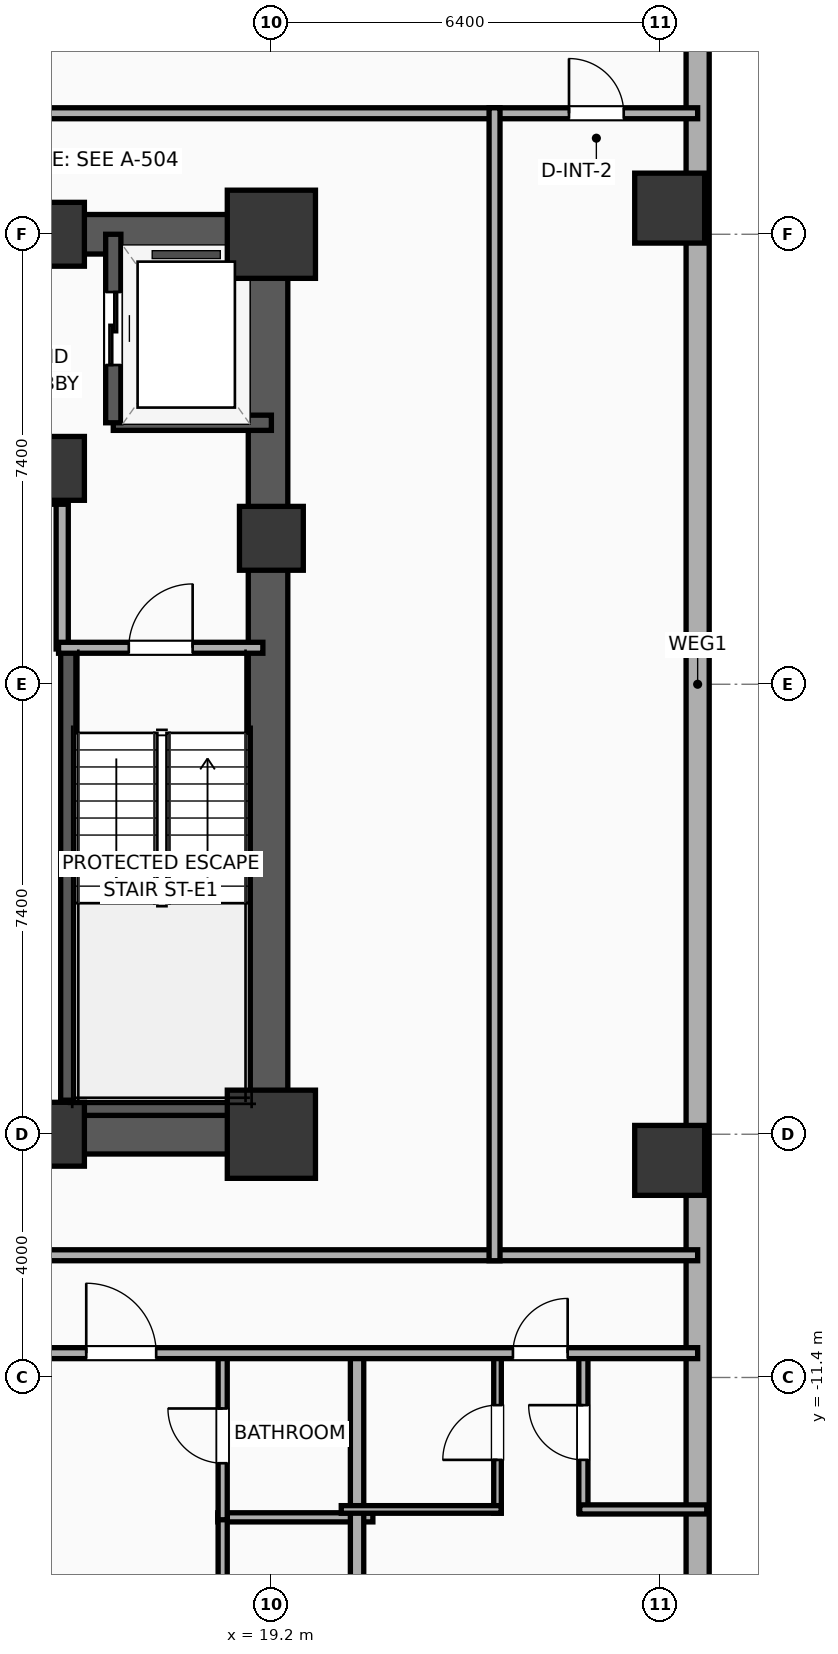
"""IFC4 building model, lengths in metres.
Left out: names, types, materials, properties, quantities, classifications, styles, units other than length and angle.
Written with IfcOpenShell. Run it as: python <this file> out.ifc"""

import sys

from ifc_helpers import new_model, si_unit, direction, frame, frame_2d, origin, origin_2d, place, context, subcontext, project, spatial, rectangle, hollow_rectangle, extrude, element, fill, save


model = new_model("IFC4")
c1 = context("Model", 3, precision=1e-05, world=origin(), true_north=direction((0.0, 1.0)))
c2 = subcontext(c1, "Body", "Model", "MODEL_VIEW")
j1 = project(units=[si_unit("LENGTHUNIT", "METRE"), si_unit("PLANEANGLEUNIT", "RADIAN")], contexts=[c1])
p1 = place(None, origin())
s1 = spatial("IfcSite", under=j1, at=p1, CompositionType="ELEMENT")
p2 = place(p1, origin())
s2 = spatial("IfcBuilding", under=s1, at=p2, CompositionType="ELEMENT")
p3 = place(p2, frame((0.0, 0.0, 65.0)))
s3 = spatial("IfcBuildingStorey", under=s2, at=p3, CompositionType="ELEMENT", Elevation=65.0)
for number, where, z_axis, x_axis in (
    (1, (15.6, 3.55, 0.0), (0.0, 0.0, 1.0), (1.0, 0.0, 0.0)),
    (2, (15.6, -7.4, 0.0), (0.0, 0.0, 1.0), (1.0, 0.0, 0.0)),
    (3, (15.6, 7.4, 0.0), (0.0, 0.0, 1.0), (1.0, 0.0, 0.0)),
):
    element("IfcColumn", number, at=place(p3, frame(where, z_axis=z_axis, x_axis=x_axis)), inside=s3, PredefinedType="COLUMN", context=c2, shape_type="SweptSolid", body=[
        extrude(rectangle(XDim=1.05, YDim=1.05, at=origin_2d()), origin(), (0.0, 0.0, 1.0), 3.9),
    ])
p4 = place(p3, frame((19.2, -7.4, 0.0), z_axis=(0.0, 0.0, 1.0), x_axis=(1.0, 0.0, 0.0)))
e4 = element("IfcColumn", 4, at=p4, inside=s3, PredefinedType="COLUMN", context=c2, shape_type="SweptSolid", body=[
    extrude(rectangle(XDim=1.45, YDim=1.45, at=origin_2d()), origin(), (0.0, 0.0, 1.0), 3.9),
])
p5 = place(p3, frame((19.2, 2.4, 0.0), z_axis=(0.0, 0.0, 1.0), x_axis=(1.0, 0.0, 0.0)))
e5 = element("IfcColumn", 5, at=p5, inside=s3, PredefinedType="COLUMN", context=c2, shape_type="SweptSolid", body=[
    extrude(rectangle(XDim=1.05, YDim=1.05, at=origin_2d()), origin(), (0.0, 0.0, 1.0), 3.9),
])
p6 = place(p3, frame((19.2, 7.4, 0.0), z_axis=(0.0, 0.0, 1.0), x_axis=(1.0, 0.0, 0.0)))
e6 = element("IfcColumn", 6, at=p6, inside=s3, PredefinedType="COLUMN", context=c2, shape_type="SweptSolid", body=[
    extrude(rectangle(XDim=1.45, YDim=1.45, at=origin_2d()), origin(), (0.0, 0.0, 1.0), 3.9),
])
for number, where, z_axis, x_axis in (
    (7, (12.075, -7.4, 0.0), (0.0, 0.0, 1.0), (1.0, 0.0, 0.0)),
    (8, (12.075, 7.4, 0.0), (0.0, 0.0, 1.0), (1.0, 0.0, 0.0)),
):
    element("IfcWall", number, at=place(p3, frame(where, z_axis=z_axis, x_axis=x_axis)), inside=s3, PredefinedType="SHEAR", context=c2, shape_type="SweptSolid", body=[
        extrude(rectangle(XDim=7.45, YDim=0.65, at=frame_2d((3.725, 0.0))), origin(), (0.0, 0.0, 1.0), 3.65),
    ])
p7 = place(p3, frame((19.145, -7.4, 0.0), z_axis=(0.0, 0.0, 1.0), x_axis=(0.0, 1.0, 0.0)))
e9 = element("IfcWall", 9, at=p7, inside=s3, PredefinedType="SHEAR", context=c2, shape_type="SweptSolid", body=[
    extrude(rectangle(XDim=14.8, YDim=0.65, at=frame_2d((7.4, 0.0))), origin(), (0.0, 0.0, 1.0), 3.65),
])
p8 = place(p3, frame((15.86, -7.085, 0.0), z_axis=(0.0, 0.0, 1.0), x_axis=(0.0, 1.0, 0.0)))
e10 = element("IfcWall", 10, at=p8, inside=s3, PredefinedType="SOLIDWALL", context=c2, shape_type="SweptSolid", body=[
    extrude(rectangle(XDim=7.685, YDim=0.25, at=frame_2d((3.843, 0.0))), origin(), (0.0, 0.0, 1.0), 3.65),
])
p9 = place(p3, frame((15.74, -6.965, 0.0), z_axis=(0.0, 0.0, 1.0), x_axis=(1.0, 0.0, 0.0)))
e11 = element("IfcWall", 11, at=p9, inside=s3, PredefinedType="SOLIDWALL", context=c2, shape_type="SweptSolid", body=[
    extrude(rectangle(XDim=3.46, YDim=0.25, at=frame_2d((1.73, 0.0))), origin(), (0.0, 0.0, 1.0), 3.65),
])
for number, where, z_axis, x_axis in (
    (12, (25.75, -7.83, 0.0), (0.0, 0.0, 1.0), (1.0, 0.0, 0.0)),
    (13, (25.75, 7.83, 0.0), (0.0, 0.0, 1.0), (1.0, 0.0, 0.0)),
):
    element("IfcColumn", number, at=place(p3, frame(where, z_axis=z_axis, x_axis=x_axis)), inside=s3, PredefinedType="COLUMN", context=c2, shape_type="SweptSolid", body=[
        extrude(hollow_rectangle(XDim=1.15, YDim=1.15, WallThickness=0.04, at=origin_2d()), origin(), (0.0, 0.0, 1.0), 3.9),
    ])
p10 = place(p3, frame((26.21, 18.381, 0.0), z_axis=(0.0, 0.0, 1.0), x_axis=(0.0, -1.0, 0.0)))
e14 = element("IfcWall", 14, at=p10, inside=s3, PredefinedType="ELEMENTEDWALL", context=c2, shape_type="SweptSolid", body=[
    extrude(rectangle(XDim=36.763, YDim=0.38, at=frame_2d((18.381, 0.0))), origin(), (0.0, 0.0, 1.0), 3.65),
])
p11 = place(p3, frame((16.6, 4.3, 0.0), z_axis=(0.0, 0.0, 1.0), x_axis=(1.0, 0.0, 0.0)))
e15 = element("IfcWall", 15, at=p11, inside=s3, PredefinedType="SOLIDWALL", context=c2, shape_type="SweptSolid", body=[
    extrude(rectangle(XDim=2.6, YDim=0.25, at=frame_2d((1.3, 0.0))), origin(), (0.0, 0.0, 1.0), 3.65),
])
p12 = place(p3, frame((16.6, 7.4, 0.0), z_axis=(0.0, 0.0, 1.0), x_axis=(0.0, -1.0, 0.0)))
e16 = element("IfcWall", 16, at=p12, inside=s3, PredefinedType="SOLIDWALL", context=c2, shape_type="SweptSolid", body=[
    extrude(rectangle(XDim=3.1, YDim=0.25, at=frame_2d((1.55, 0.0))), origin(), (0.0, 0.0, 1.0), 3.65),
])
p13 = place(p12, frame((0.95, 0.0, 0.0)))
e17 = element("IfcOpeningElement", 17, at=p13, cuts=e16, PredefinedType="OPENING", context=c2, shape_type="SweptSolid", body=[
    extrude(rectangle(XDim=1.2, YDim=2.05, at=frame_2d((0.6, 1.025))), frame((0.0, 0.135, 0.0), z_axis=(0.0, -1.0, 0.0), x_axis=(1.0, 0.0, 0.0)), (0.0, 0.0, 1.0), 0.27),
])
p14 = place(p3, frame((15.76, 0.58, 0.0), z_axis=(0.0, 0.0, 1.0), x_axis=(0.0, 1.0, 0.0)))
e18 = element("IfcWall", 18, at=p14, inside=s3, PredefinedType="PARTITIONING", context=c2, shape_type="SweptSolid", body=[
    extrude(rectangle(XDim=2.52, YDim=0.2, at=frame_2d((1.26, 0.0))), origin(), (0.0, 0.0, 1.0), 3.65),
])
p15 = place(p3, frame((12.66, 3.06, 0.0), z_axis=(0.0, 0.0, 1.0), x_axis=(1.0, 0.0, 0.0)))
e19 = element("IfcWall", 19, at=p15, inside=s3, PredefinedType="PARTITIONING", context=c2, shape_type="SweptSolid", body=[
    extrude(rectangle(XDim=3.16, YDim=0.2, at=frame_2d((1.58, 0.0))), origin(), (0.0, 0.0, 1.0), 3.65),
])
p16 = place(p3, frame((15.7, 0.6, 0.0), z_axis=(0.0, 0.0, 1.0), x_axis=(1.0, 0.0, 0.0)))
e20 = element("IfcWall", 20, at=p16, inside=s3, PredefinedType="PARTITIONING", context=c2, shape_type="SweptSolid", body=[
    extrude(rectangle(XDim=3.36, YDim=0.18, at=frame_2d((1.68, 0.0))), origin(), (0.0, 0.0, 1.0), 3.65),
])
p17 = place(p16, frame((1.155, 0.0, 0.0)))
e21 = element("IfcOpeningElement", 21, at=p17, cuts=e20, PredefinedType="OPENING", context=c2, shape_type="SweptSolid", body=[
    extrude(rectangle(XDim=1.05, YDim=2.05, at=frame_2d((0.525, 1.025))), frame((0.0, 0.1, 0.0), z_axis=(0.0, -1.0, 0.0), x_axis=(1.0, 0.0, 0.0)), (0.0, 0.0, 1.0), 0.2),
])
p18 = place(p3, frame((9.88, 9.39, 0.0), z_axis=(0.0, 0.0, 1.0), x_axis=(1.0, 0.0, 0.0)))
e22 = element("IfcWall", 22, at=p18, inside=s3, PredefinedType="PARTITIONING", context=c2, shape_type="SweptSolid", body=[
    extrude(rectangle(XDim=16.33, YDim=0.18, at=frame_2d((8.165, 0.0))), origin(), (0.0, 0.0, 1.0), 3.65),
])
p19 = place(p18, frame((14.214, 0.0, 0.0)))
e23 = element("IfcOpeningElement", 23, at=p19, cuts=e22, PredefinedType="OPENING", context=c2, shape_type="SweptSolid", body=[
    extrude(rectangle(XDim=0.9, YDim=2.05, at=frame_2d((0.45, 1.025))), frame((0.0, 0.1, 0.0), z_axis=(0.0, -1.0, 0.0), x_axis=(1.0, 0.0, 0.0)), (0.0, 0.0, 1.0), 0.2),
])
p20 = place(p3, frame((9.88, -9.39, 0.0), z_axis=(0.0, 0.0, 1.0), x_axis=(1.0, 0.0, 0.0)))
e24 = element("IfcWall", 24, at=p20, inside=s3, PredefinedType="PARTITIONING", context=c2, shape_type="SweptSolid", body=[
    extrude(rectangle(XDim=16.33, YDim=0.18, at=frame_2d((8.165, 0.0))), origin(), (0.0, 0.0, 1.0), 3.65),
])
p21 = place(p3, frame((18.319, -13.7, 0.0), z_axis=(0.0, 0.0, 1.0), x_axis=(1.0, 0.0, 0.0)))
e25 = element("IfcWall", 25, at=p21, inside=s3, PredefinedType="PLUMBINGWALL", context=c2, shape_type="SweptSolid", body=[
    extrude(rectangle(XDim=2.55, YDim=0.15, at=frame_2d((1.275, 0.0))), origin(), (0.0, 0.0, 1.0), 3.65),
])
p22 = place(p3, frame((18.399, -22.258, 0.0), z_axis=(0.0, 0.0, 1.0), x_axis=(0.0, 1.0, 0.0)))
e26 = element("IfcWall", 26, at=p22, inside=s3, PredefinedType="PLUMBINGWALL", context=c2, shape_type="SweptSolid", body=[
    extrude(rectangle(XDim=8.598, YDim=0.15, at=frame_2d((4.299, 0.0))), origin(), (0.0, 0.0, 1.0), 3.65),
])
p23 = place(p22, frame((6.6, 0.0, 0.0)))
e27 = element("IfcOpeningElement", 27, at=p23, cuts=e26, PredefinedType="OPENING", context=c2, shape_type="SweptSolid", body=[
    extrude(rectangle(XDim=0.9, YDim=2.05, at=frame_2d((0.45, 1.025))), frame((0.0, 0.085, 0.0), z_axis=(0.0, -1.0, 0.0), x_axis=(1.0, 0.0, 0.0)), (0.0, 0.0, 1.0), 0.17),
])
p24 = place(p3, frame((18.399, -13.74, 0.0), z_axis=(0.0, 0.0, 1.0), x_axis=(0.0, 1.0, 0.0)))
e28 = element("IfcWall", 28, at=p24, inside=s3, PredefinedType="PLUMBINGWALL", context=c2, shape_type="SweptSolid", body=[
    extrude(rectangle(XDim=2.76, YDim=0.15, at=frame_2d((1.38, 0.0))), origin(), (0.0, 0.0, 1.0), 3.65),
])
p25 = place(p24, frame((0.93, 0.0, 0.0)))
e29 = element("IfcOpeningElement", 29, at=p25, cuts=e28, PredefinedType="OPENING", context=c2, shape_type="SweptSolid", body=[
    extrude(rectangle(XDim=0.9, YDim=2.05, at=frame_2d((0.45, 1.025))), frame((0.0, 0.085, 0.0), z_axis=(0.0, -1.0, 0.0), x_axis=(1.0, 0.0, 0.0)), (0.0, 0.0, 1.0), 0.17),
])
p26 = place(p3, frame((20.609, -22.21, 0.0), z_axis=(0.0, 0.0, 1.0), x_axis=(0.0, 1.0, 0.0)))
e30 = element("IfcWall", 30, at=p26, inside=s3, PredefinedType="PARTITIONING", context=c2, shape_type="SweptSolid", body=[
    extrude(rectangle(XDim=11.29, YDim=0.22, at=frame_2d((5.645, 0.0))), origin(), (0.0, 0.0, 1.0), 2.94),
])
p27 = place(p3, frame((22.919, -13.63, 0.0), z_axis=(0.0, 0.0, 1.0), x_axis=(0.0, 1.0, 0.0)))
e31 = element("IfcWall", 31, at=p27, inside=s3, PredefinedType="PARTITIONING", context=c2, shape_type="SweptSolid", body=[
    extrude(rectangle(XDim=2.65, YDim=0.125, at=frame_2d((1.325, 0.0))), origin(), (0.0, 0.0, 1.0), 3.65),
])
p28 = place(p27, frame((0.875, 0.0, 0.0)))
e32 = element("IfcOpeningElement", 32, at=p28, cuts=e31, PredefinedType="OPENING", context=c2, shape_type="SweptSolid", body=[
    extrude(rectangle(XDim=0.9, YDim=2.05, at=frame_2d((0.45, 1.025))), frame((0.0, 0.073, 0.0), z_axis=(0.0, -1.0, 0.0), x_axis=(1.0, 0.0, 0.0)), (0.0, 0.0, 1.0), 0.145),
])
p29 = place(p3, frame((24.331, -13.63, 0.0), z_axis=(0.0, 0.0, 1.0), x_axis=(0.0, 1.0, 0.0)))
e33 = element("IfcWall", 33, at=p29, inside=s3, PredefinedType="PLUMBINGWALL", context=c2, shape_type="SweptSolid", body=[
    extrude(rectangle(XDim=2.65, YDim=0.15, at=frame_2d((1.325, 0.0))), origin(), (0.0, 0.0, 1.0), 3.65),
])
p30 = place(p29, frame((0.875, 0.0, 0.0)))
e34 = element("IfcOpeningElement", 34, at=p30, cuts=e33, PredefinedType="OPENING", context=c2, shape_type="SweptSolid", body=[
    extrude(rectangle(XDim=0.9, YDim=2.05, at=frame_2d((0.45, 1.025))), frame((0.0, 0.085, 0.0), z_axis=(0.0, -1.0, 0.0), x_axis=(1.0, 0.0, 0.0)), (0.0, 0.0, 1.0), 0.17),
])
p31 = place(p3, frame((20.349, -13.57, 0.0), z_axis=(0.0, 0.0, 1.0), x_axis=(1.0, 0.0, 0.0)))
e35 = element("IfcWall", 35, at=p31, inside=s3, PredefinedType="PARTITIONING", context=c2, shape_type="SweptSolid", body=[
    extrude(rectangle(XDim=2.63, YDim=0.125, at=frame_2d((1.315, 0.0))), origin(), (0.0, 0.0, 1.0), 3.65),
])
p32 = place(p3, frame((24.271, -13.57, 0.0), z_axis=(0.0, 0.0, 1.0), x_axis=(1.0, 0.0, 0.0)))
e36 = element("IfcWall", 36, at=p32, inside=s3, PredefinedType="PLUMBINGWALL", context=c2, shape_type="SweptSolid", body=[
    extrude(rectangle(XDim=2.089, YDim=0.15, at=frame_2d((1.044, 0.0))), origin(), (0.0, 0.0, 1.0), 3.65),
])
p33 = place(p3, frame((-33.41, -11.0, 0.0), z_axis=(0.0, 0.0, 1.0), x_axis=(1.0, 0.0, 0.0)))
e37 = element("IfcWall", 37, at=p33, inside=s3, PredefinedType="PARTITIONING", context=c2, shape_type="SweptSolid", body=[
    extrude(rectangle(XDim=59.62, YDim=0.18, at=frame_2d((29.81, 0.0))), origin(), (0.0, 0.0, 1.0), 3.65),
])
p34 = place(p33, frame((3.08, 0.0, 0.0)))
e38 = element("IfcOpeningElement", 38, at=p34, cuts=e37, PredefinedType="OPENING", context=c2, shape_type="SweptSolid", body=[
    extrude(rectangle(XDim=0.9, YDim=2.05, at=frame_2d((0.45, 1.025))), frame((0.0, 0.1, 0.0), z_axis=(0.0, -1.0, 0.0), x_axis=(1.0, 0.0, 0.0)), (0.0, 0.0, 1.0), 0.2),
])
p35 = place(p33, frame((9.918, 0.0, 0.0)))
e39 = element("IfcOpeningElement", 39, at=p35, cuts=e37, PredefinedType="OPENING", context=c2, shape_type="SweptSolid", body=[
    extrude(rectangle(XDim=0.9, YDim=2.05, at=frame_2d((0.45, 1.025))), frame((0.0, 0.1, 0.0), z_axis=(0.0, -1.0, 0.0), x_axis=(1.0, 0.0, 0.0)), (0.0, 0.0, 1.0), 0.2),
])
p36 = place(p33, frame((16.721, 0.0, 0.0)))
e40 = element("IfcOpeningElement", 40, at=p36, cuts=e37, PredefinedType="OPENING", context=c2, shape_type="SweptSolid", body=[
    extrude(rectangle(XDim=0.9, YDim=2.05, at=frame_2d((0.45, 1.025))), frame((0.0, 0.1, 0.0), z_axis=(0.0, -1.0, 0.0), x_axis=(1.0, 0.0, 0.0)), (0.0, 0.0, 1.0), 0.2),
])
p37 = place(p33, frame((23.625, 0.0, 0.0)))
e41 = element("IfcOpeningElement", 41, at=p37, cuts=e37, PredefinedType="OPENING", context=c2, shape_type="SweptSolid", body=[
    extrude(rectangle(XDim=0.9, YDim=2.05, at=frame_2d((0.45, 1.025))), frame((0.0, 0.1, 0.0), z_axis=(0.0, -1.0, 0.0), x_axis=(1.0, 0.0, 0.0)), (0.0, 0.0, 1.0), 0.2),
])
p38 = place(p33, frame((30.624, 0.0, 0.0)))
e42 = element("IfcOpeningElement", 42, at=p38, cuts=e37, PredefinedType="OPENING", context=c2, shape_type="SweptSolid", body=[
    extrude(rectangle(XDim=0.9, YDim=2.05, at=frame_2d((0.45, 1.025))), frame((0.0, 0.1, 0.0), z_axis=(0.0, -1.0, 0.0), x_axis=(1.0, 0.0, 0.0)), (0.0, 0.0, 1.0), 0.2),
])
p39 = place(p33, frame((37.623, 0.0, 0.0)))
e43 = element("IfcOpeningElement", 43, at=p39, cuts=e37, PredefinedType="OPENING", context=c2, shape_type="SweptSolid", body=[
    extrude(rectangle(XDim=0.9, YDim=2.05, at=frame_2d((0.45, 1.025))), frame((0.0, 0.1, 0.0), z_axis=(0.0, -1.0, 0.0), x_axis=(1.0, 0.0, 0.0)), (0.0, 0.0, 1.0), 0.2),
])
p40 = place(p33, frame((44.623, 0.0, 0.0)))
e44 = element("IfcOpeningElement", 44, at=p40, cuts=e37, PredefinedType="OPENING", context=c2, shape_type="SweptSolid", body=[
    extrude(rectangle(XDim=0.9, YDim=2.05, at=frame_2d((0.45, 1.025))), frame((0.0, 0.1, 0.0), z_axis=(0.0, -1.0, 0.0), x_axis=(1.0, 0.0, 0.0)), (0.0, 0.0, 1.0), 0.2),
])
p41 = place(p33, frame((49.565, 0.0, 0.0)))
e45 = element("IfcOpeningElement", 45, at=p41, cuts=e37, PredefinedType="OPENING", context=c2, shape_type="SweptSolid", body=[
    extrude(rectangle(XDim=1.15, YDim=2.05, at=frame_2d((0.575, 1.025))), frame((0.0, 0.1, 0.0), z_axis=(0.0, -1.0, 0.0), x_axis=(1.0, 0.0, 0.0)), (0.0, 0.0, 1.0), 0.2),
])
p42 = place(p33, frame((56.583, 0.0, 0.0)))
e46 = element("IfcOpeningElement", 46, at=p42, cuts=e37, PredefinedType="OPENING", context=c2, shape_type="SweptSolid", body=[
    extrude(rectangle(XDim=0.9, YDim=2.05, at=frame_2d((0.45, 1.025))), frame((0.0, 0.1, 0.0), z_axis=(0.0, -1.0, 0.0), x_axis=(1.0, 0.0, 0.0)), (0.0, 0.0, 1.0), 0.2),
])
p43 = place(p3, frame((22.87, -9.48, 0.0), z_axis=(0.0, 0.0, 1.0), x_axis=(0.0, 1.0, 0.0)))
e47 = element("IfcWall", 47, at=p43, inside=s3, PredefinedType="PARTITIONING", context=c2, shape_type="SweptSolid", body=[
    extrude(rectangle(XDim=18.96, YDim=0.18, at=frame_2d((9.48, 0.0))), origin(), (0.0, 0.0, 1.0), 3.65),
])
p44 = place(p13, origin())
e48 = element("IfcDoor", 48, at=p44, inside=s3, OperationType="SLIDING_TO_LEFT", PredefinedType="DOOR", context=c2, shape_type="SweptSolid", body=[
    extrude(rectangle(XDim=1.2, YDim=2.05, at=frame_2d((0.6, 1.025))), frame((0.0, 0.025, 0.0), z_axis=(0.0, -1.0, 0.0), x_axis=(1.0, 0.0, 0.0)), (0.0, 0.0, 1.0), 0.05),
])
fill(e17, e48)
p45 = place(p17, origin())
e49 = element("IfcDoor", 49, at=p45, inside=s3, OperationType="SINGLE_SWING_RIGHT", PredefinedType="DOOR", context=c2, shape_type="SweptSolid", body=[
    extrude(rectangle(XDim=1.05, YDim=2.05, at=frame_2d((0.525, 1.025))), frame((0.0, 0.025, 0.0), z_axis=(0.0, -1.0, 0.0), x_axis=(1.0, 0.0, 0.0)), (0.0, 0.0, 1.0), 0.05),
])
fill(e21, e49)
p46 = place(p19, origin())
e50 = element("IfcDoor", 50, at=p46, inside=s3, OperationType="SINGLE_SWING_LEFT", PredefinedType="DOOR", context=c2, shape_type="SweptSolid", body=[
    extrude(rectangle(XDim=0.9, YDim=2.05, at=frame_2d((0.45, 1.025))), frame((0.0, 0.025, 0.0), z_axis=(0.0, -1.0, 0.0), x_axis=(1.0, 0.0, 0.0)), (0.0, 0.0, 1.0), 0.05),
])
fill(e23, e50)
p47 = place(p25, origin())
e51 = element("IfcDoor", 51, at=p47, inside=s3, OperationType="SINGLE_SWING_RIGHT", PredefinedType="DOOR", context=c2, shape_type="SweptSolid", body=[
    extrude(rectangle(XDim=0.9, YDim=2.05, at=frame_2d((0.45, 1.025))), frame((0.0, 0.025, 0.0), z_axis=(0.0, -1.0, 0.0), x_axis=(1.0, 0.0, 0.0)), (0.0, 0.0, 1.0), 0.05),
])
fill(e29, e51)
p48 = place(p28, origin())
e52 = element("IfcDoor", 52, at=p48, inside=s3, OperationType="SINGLE_SWING_LEFT", PredefinedType="DOOR", context=c2, shape_type="SweptSolid", body=[
    extrude(rectangle(XDim=0.9, YDim=2.05, at=frame_2d((0.45, 1.025))), frame((0.0, 0.025, 0.0), z_axis=(0.0, -1.0, 0.0), x_axis=(1.0, 0.0, 0.0)), (0.0, 0.0, 1.0), 0.05),
])
fill(e32, e52)
p49 = place(p30, origin())
e53 = element("IfcDoor", 53, at=p49, inside=s3, OperationType="SINGLE_SWING_RIGHT", PredefinedType="DOOR", context=c2, shape_type="SweptSolid", body=[
    extrude(rectangle(XDim=0.9, YDim=2.05, at=frame_2d((0.45, 1.025))), frame((0.0, 0.025, 0.0), z_axis=(0.0, -1.0, 0.0), x_axis=(1.0, 0.0, 0.0)), (0.0, 0.0, 1.0), 0.05),
])
fill(e34, e53)
p50 = place(p41, origin())
e54 = element("IfcDoor", 54, at=p50, inside=s3, OperationType="SINGLE_SWING_LEFT", PredefinedType="DOOR", context=c2, shape_type="SweptSolid", body=[
    extrude(rectangle(XDim=1.15, YDim=2.05, at=frame_2d((0.575, 1.025))), frame((0.0, 0.025, 0.0), z_axis=(0.0, -1.0, 0.0), x_axis=(1.0, 0.0, 0.0)), (0.0, 0.0, 1.0), 0.05),
])
fill(e45, e54)
p51 = place(p42, origin())
e55 = element("IfcDoor", 55, at=p51, inside=s3, OperationType="SINGLE_SWING_RIGHT", PredefinedType="DOOR", context=c2, shape_type="SweptSolid", body=[
    extrude(rectangle(XDim=0.9, YDim=2.05, at=frame_2d((0.45, 1.025))), frame((0.0, 0.025, 0.0), z_axis=(0.0, -1.0, 0.0), x_axis=(1.0, 0.0, 0.0)), (0.0, 0.0, 1.0), 0.05),
])
fill(e46, e55)
save(model, sys.argv[1])
